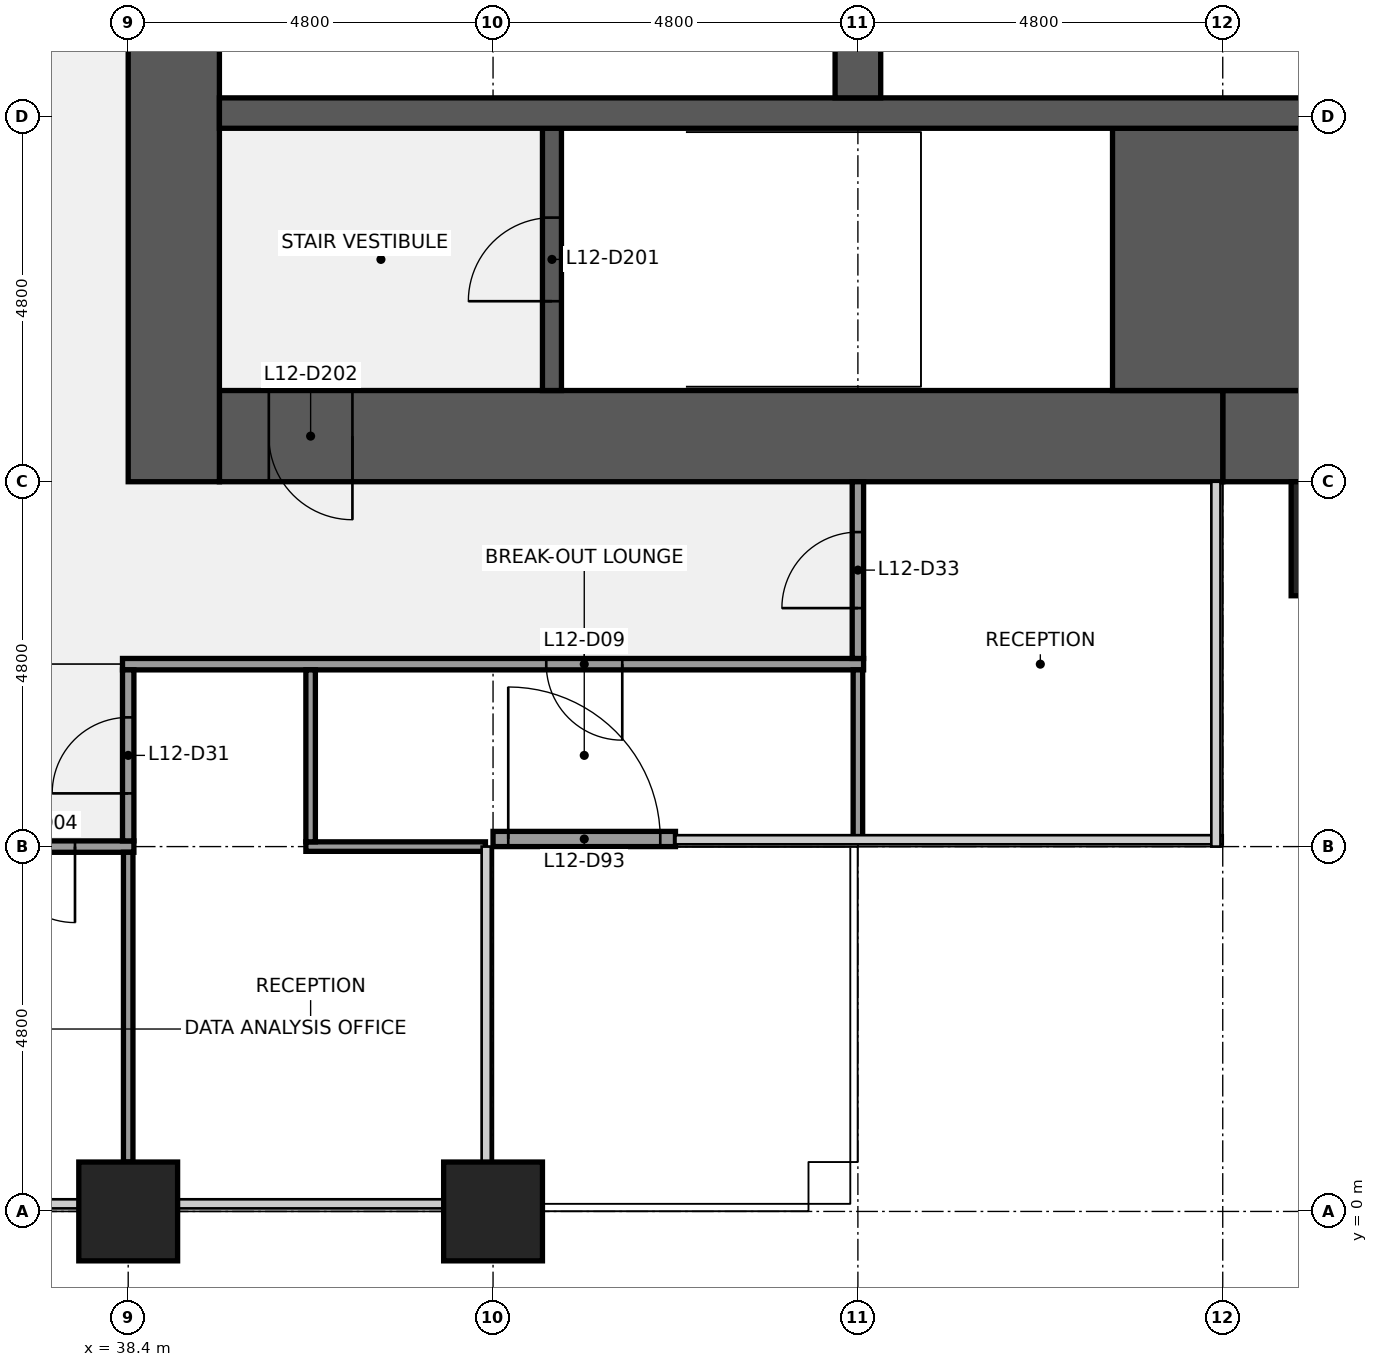
"""IFC4 building model, lengths in metres.
Left out: names, types, materials, properties, quantities, classifications, styles, units other than length and angle.
Written with IfcOpenShell. Run it as: python <this file> out.ifc"""

import sys

from ifc_helpers import new_model, si_unit, direction, frame, frame_2d, origin, origin_2d, place, context, subcontext, project, spatial, rectangle, extrude, element, fill, save


model = new_model("IFC4")
c1 = context("Model", 3, precision=1e-05, world=origin(), true_north=direction((0.0, 1.0)))
c2 = subcontext(c1, "Body", "Model", "MODEL_VIEW")
j1 = project(units=[si_unit("LENGTHUNIT", "METRE"), si_unit("PLANEANGLEUNIT", "RADIAN")], contexts=[c1])
p1 = place(None, origin())
s1 = spatial("IfcSite", under=j1, at=p1, CompositionType="ELEMENT")
p2 = place(p1, origin())
s2 = spatial("IfcBuilding", under=s1, at=p2, CompositionType="ELEMENT")
p3 = place(p2, frame((0.0, 0.0, 59.0)))
s3 = spatial("IfcBuildingStorey", under=s2, at=p3, CompositionType="ELEMENT", Elevation=59.0)
for number, where, z_axis, x_axis in (
    (1, (38.4, 0.0, 0.0), (0.0, 0.0, 1.0), (1.0, 0.0, 0.0)),
    (2, (43.2, 0.0, 0.0), (0.0, 0.0, 1.0), (1.0, 0.0, 0.0)),
):
    element("IfcColumn", number, at=place(p3, frame(where, z_axis=z_axis, x_axis=x_axis)), inside=s3, PredefinedType="COLUMN", context=c2, shape_type="SweptSolid", body=[
        extrude(rectangle(XDim=1.3, YDim=1.3, at=origin_2d()), origin(), (0.0, 0.0, 1.0), 4.0),
    ])
p4 = place(p3, frame((56.4, 10.2, 0.0), z_axis=(0.0, 0.0, 1.0), x_axis=(-1.0, 0.0, 0.0)))
e3 = element("IfcWall", 3, at=p4, inside=s3, PredefinedType="SHEAR", context=c2, shape_type="SweptSolid", body=[
    extrude(rectangle(XDim=3.6, YDim=1.2, at=frame_2d((1.8, 0.0))), origin(), (0.0, 0.0, 1.0), 3.84),
])
p5 = place(p3, frame((52.8, 10.2, 0.0), z_axis=(0.0, 0.0, 1.0), x_axis=(-1.0, 0.0, 0.0)))
e4 = element("IfcWall", 4, at=p5, inside=s3, PredefinedType="SHEAR", context=c2, shape_type="SweptSolid", body=[
    extrude(rectangle(XDim=13.2, YDim=1.2, at=frame_2d((6.6, 0.0))), origin(), (0.0, 0.0, 1.0), 3.84),
])
p6 = place(p5, frame((11.45, 0.0, 0.0)))
e5 = element("IfcOpeningElement", 5, at=p6, cuts=e4, PredefinedType="OPENING", context=c2, shape_type="SweptSolid", body=[
    extrude(rectangle(XDim=1.1, YDim=2.1, at=frame_2d((0.55, 1.05))), frame((0.0, 0.61, 0.0), z_axis=(0.0, -1.0, 0.0), x_axis=(1.0, 0.0, 0.0)), (0.0, 0.0, 1.0), 1.22),
])
p7 = place(p3, frame((39.0, 9.6, 0.0), z_axis=(0.0, 0.0, 1.0), x_axis=(0.0, 1.0, 0.0)))
e6 = element("IfcWall", 6, at=p7, inside=s3, PredefinedType="SHEAR", context=c2, shape_type="SweptSolid", body=[
    extrude(rectangle(XDim=28.8, YDim=1.2, at=frame_2d((14.4, 0.0))), origin(), (0.0, 0.0, 1.0), 3.84),
])
p8 = place(p7, frame((8.7, 0.0, 0.0)))
e7 = element("IfcOpeningElement", 7, at=p8, cuts=e6, PredefinedType="OPENING", context=c2, shape_type="SweptSolid", body=[
    extrude(rectangle(XDim=1.8, YDim=2.1, at=frame_2d((0.9, 1.05))), frame((0.0, 0.61, 0.0), z_axis=(0.0, -1.0, 0.0), x_axis=(1.0, 0.0, 0.0)), (0.0, 0.0, 1.0), 1.22),
])
p9 = place(p7, frame((18.3, 0.0, 0.0)))
e8 = element("IfcOpeningElement", 8, at=p9, cuts=e6, PredefinedType="OPENING", context=c2, shape_type="SweptSolid", body=[
    extrude(rectangle(XDim=1.8, YDim=2.1, at=frame_2d((0.9, 1.05))), frame((0.0, 0.61, 0.0), z_axis=(0.0, -1.0, 0.0), x_axis=(1.0, 0.0, 0.0)), (0.0, 0.0, 1.0), 1.22),
])
p10 = place(p3, frame((51.35, 12.525, 0.0), z_axis=(0.0, 0.0, 1.0), x_axis=(1.0, 0.0, 0.0)))
e9 = element("IfcWall", 9, at=p10, inside=s3, PredefinedType="SHEAR", context=c2, shape_type="SweptSolid", body=[
    extrude(rectangle(XDim=5.05, YDim=3.45, at=frame_2d((2.525, 0.0))), origin(), (0.0, 0.0, 1.0), 3.84),
])
p11 = place(p3, frame((43.975, 10.8, 0.0), z_axis=(0.0, 0.0, 1.0), x_axis=(0.0, 1.0, 0.0)))
e10 = element("IfcWall", 10, at=p11, inside=s3, PredefinedType="SHEAR", context=c2, shape_type="SweptSolid", body=[
    extrude(rectangle(XDim=3.45, YDim=0.25, at=frame_2d((1.725, 0.0))), origin(), (0.0, 0.0, 1.0), 3.84),
])
p12 = place(p11, frame((1.175, 0.0, 0.0)))
e11 = element("IfcOpeningElement", 11, at=p12, cuts=e10, PredefinedType="OPENING", context=c2, shape_type="SweptSolid", body=[
    extrude(rectangle(XDim=1.1, YDim=2.1, at=frame_2d((0.55, 1.05))), frame((0.0, 0.135, 0.0), z_axis=(0.0, -1.0, 0.0), x_axis=(1.0, 0.0, 0.0)), (0.0, 0.0, 1.0), 0.27),
])
p13 = place(p3, frame((39.6, 14.45, 0.0), z_axis=(0.0, 0.0, 1.0), x_axis=(1.0, 0.0, 0.0)))
e12 = element("IfcWall", 12, at=p13, inside=s3, PredefinedType="SHEAR", context=c2, shape_type="SweptSolid", body=[
    extrude(rectangle(XDim=16.8, YDim=0.4, at=frame_2d((8.4, 0.0))), origin(), (0.0, 0.0, 1.0), 3.84),
])
p14 = place(p3, frame((48.0, 14.65, 0.0), z_axis=(0.0, 0.0, 1.0), x_axis=(0.0, 1.0, 0.0)))
e13 = element("IfcWall", 13, at=p14, inside=s3, PredefinedType="SHEAR", context=c2, shape_type="SweptSolid", body=[
    extrude(rectangle(XDim=2.6, YDim=0.6, at=frame_2d((1.3, 0.0))), origin(), (0.0, 0.0, 1.0), 3.84),
])
p15 = place(p3, frame((40.738, 4.8, 0.0), z_axis=(0.0, 0.0, 1.0), x_axis=(1.0, 0.0, 0.0)))
e14 = element("IfcWall", 14, at=p15, inside=s3, PredefinedType="PARTITIONING", context=c2, shape_type="SweptSolid", body=[
    extrude(rectangle(XDim=2.363, YDim=0.125, at=frame_2d((1.181, 0.0))), origin(), (0.0, 0.0, 1.0), 2.87),
])
p16 = place(p3, frame((19.125, 4.8, 0.0), z_axis=(0.0, 0.0, 1.0), x_axis=(1.0, 0.0, 0.0)))
e15 = element("IfcWall", 15, at=p16, inside=s3, PredefinedType="PARTITIONING", context=c2, shape_type="SweptSolid", body=[
    extrude(rectangle(XDim=19.35, YDim=0.15, at=frame_2d((9.675, 0.0))), origin(), (0.0, 0.0, 1.0), 2.87),
])
p17 = place(p16, frame((4.375, 0.0, 0.0)))
e16 = element("IfcOpeningElement", 16, at=p17, cuts=e15, PredefinedType="OPENING", context=c2, shape_type="SweptSolid", body=[
    extrude(rectangle(XDim=1.0, YDim=2.1, at=frame_2d((0.5, 1.05))), frame((0.0, 0.085, 0.0), z_axis=(0.0, -1.0, 0.0), x_axis=(1.0, 0.0, 0.0)), (0.0, 0.0, 1.0), 0.17),
])
p18 = place(p16, frame((10.375, 0.0, 0.0)))
e17 = element("IfcOpeningElement", 17, at=p18, cuts=e15, PredefinedType="OPENING", context=c2, shape_type="SweptSolid", body=[
    extrude(rectangle(XDim=1.0, YDim=2.1, at=frame_2d((0.5, 1.05))), frame((0.0, 0.085, 0.0), z_axis=(0.0, -1.0, 0.0), x_axis=(1.0, 0.0, 0.0)), (0.0, 0.0, 1.0), 0.17),
])
p19 = place(p16, frame((13.975, 0.0, 0.0)))
e18 = element("IfcOpeningElement", 18, at=p19, cuts=e15, PredefinedType="OPENING", context=c2, shape_type="SweptSolid", body=[
    extrude(rectangle(XDim=1.0, YDim=2.1, at=frame_2d((0.5, 1.05))), frame((0.0, 0.085, 0.0), z_axis=(0.0, -1.0, 0.0), x_axis=(1.0, 0.0, 0.0)), (0.0, 0.0, 1.0), 0.17),
])
p20 = place(p16, frame((17.575, 0.0, 0.0)))
e19 = element("IfcOpeningElement", 19, at=p20, cuts=e15, PredefinedType="OPENING", context=c2, shape_type="SweptSolid", body=[
    extrude(rectangle(XDim=1.0, YDim=2.1, at=frame_2d((0.5, 1.05))), frame((0.0, 0.085, 0.0), z_axis=(0.0, -1.0, 0.0), x_axis=(1.0, 0.0, 0.0)), (0.0, 0.0, 1.0), 0.17),
])
p21 = place(p3, frame((38.325, 7.2, 0.0), z_axis=(0.0, 0.0, 1.0), x_axis=(1.0, 0.0, 0.0)))
e20 = element("IfcWall", 20, at=p21, inside=s3, PredefinedType="PARTITIONING", context=c2, shape_type="SweptSolid", body=[
    extrude(rectangle(XDim=9.75, YDim=0.15, at=frame_2d((4.875, 0.0))), origin(), (0.0, 0.0, 1.0), 2.87),
])
p22 = place(p21, frame((5.575, 0.0, 0.0)))
e21 = element("IfcOpeningElement", 21, at=p22, cuts=e20, PredefinedType="OPENING", context=c2, shape_type="SweptSolid", body=[
    extrude(rectangle(XDim=1.0, YDim=2.1, at=frame_2d((0.5, 1.05))), frame((0.0, 0.085, 0.0), z_axis=(0.0, -1.0, 0.0), x_axis=(1.0, 0.0, 0.0)), (0.0, 0.0, 1.0), 0.17),
])
p23 = place(p3, frame((38.4, 0.65, 0.0), z_axis=(0.0, 0.0, 1.0), x_axis=(0.0, 1.0, 0.0)))
e22 = element("IfcWall", 22, at=p23, inside=s3, PredefinedType="PARTITIONING", context=c2, shape_type="SweptSolid", body=[
    extrude(rectangle(XDim=4.075, YDim=0.125, at=frame_2d((2.038, 0.0))), origin(), (0.0, 0.0, 1.0), 2.87),
])
p24 = place(p3, frame((38.4, 4.875, 0.0), z_axis=(0.0, 0.0, 1.0), x_axis=(0.0, 1.0, 0.0)))
e23 = element("IfcWall", 23, at=p24, inside=s3, PredefinedType="PARTITIONING", context=c2, shape_type="SweptSolid", body=[
    extrude(rectangle(XDim=2.25, YDim=0.15, at=frame_2d((1.125, 0.0))), origin(), (0.0, 0.0, 1.0), 2.87),
])
p25 = place(p24, frame((0.625, 0.0, 0.0)))
e24 = element("IfcOpeningElement", 24, at=p25, cuts=e23, PredefinedType="OPENING", context=c2, shape_type="SweptSolid", body=[
    extrude(rectangle(XDim=1.0, YDim=2.1, at=frame_2d((0.5, 1.05))), frame((0.0, 0.085, 0.0), z_axis=(0.0, -1.0, 0.0), x_axis=(1.0, 0.0, 0.0)), (0.0, 0.0, 1.0), 0.17),
])
p26 = place(p3, frame((40.8, 4.863, 0.0), z_axis=(0.0, 0.0, 1.0), x_axis=(0.0, 1.0, 0.0)))
e25 = element("IfcWall", 25, at=p26, inside=s3, PredefinedType="PARTITIONING", context=c2, shape_type="SweptSolid", body=[
    extrude(rectangle(XDim=2.262, YDim=0.125, at=frame_2d((1.131, 0.0))), origin(), (0.0, 0.0, 1.0), 2.87),
])
p27 = place(p3, frame((48.0, 4.9, 0.0), z_axis=(0.0, 0.0, 1.0), x_axis=(0.0, 1.0, 0.0)))
e26 = element("IfcWall", 26, at=p27, inside=s3, PredefinedType="PARTITIONING", context=c2, shape_type="SweptSolid", body=[
    extrude(rectangle(XDim=2.225, YDim=0.125, at=frame_2d((1.113, 0.0))), origin(), (0.0, 0.0, 1.0), 2.87),
])
p28 = place(p3, frame((48.0, 7.275, 0.0), z_axis=(0.0, 0.0, 1.0), x_axis=(0.0, 1.0, 0.0)))
e27 = element("IfcWall", 27, at=p28, inside=s3, PredefinedType="PARTITIONING", context=c2, shape_type="SweptSolid", body=[
    extrude(rectangle(XDim=2.325, YDim=0.15, at=frame_2d((1.163, 0.0))), origin(), (0.0, 0.0, 1.0), 2.87),
])
p29 = place(p28, frame((0.663, 0.0, 0.0)))
e28 = element("IfcOpeningElement", 28, at=p29, cuts=e27, PredefinedType="OPENING", context=c2, shape_type="SweptSolid", body=[
    extrude(rectangle(XDim=1.0, YDim=2.1, at=frame_2d((0.5, 1.05))), frame((0.0, 0.085, 0.0), z_axis=(0.0, -1.0, 0.0), x_axis=(1.0, 0.0, 0.0)), (0.0, 0.0, 1.0), 0.17),
])
p30 = place(p3, frame((55.2, 8.85, 0.0), z_axis=(0.0, 0.0, 1.0), x_axis=(1.0, 0.0, 0.0)))
e29 = element("IfcColumn", 29, at=p30, inside=s3, PredefinedType="PILASTER", context=c2, shape_type="SweptSolid", body=[
    extrude(rectangle(XDim=3.0, YDim=1.5, at=origin_2d()), origin(), (0.0, 0.0, 1.0), 4.0),
])
p31 = place(p3, frame((43.2, 4.9, 0.0), z_axis=(0.0, 0.0, 1.0), x_axis=(1.0, 0.0, 0.0)))
e30 = element("IfcWall", 30, at=p31, inside=s3, PredefinedType="SOLIDWALL", context=c2, shape_type="SweptSolid", body=[
    extrude(rectangle(XDim=2.4, YDim=0.2, at=frame_2d((1.2, 0.0))), origin(), (0.0, 0.0, 1.0), 3.228),
])
p32 = place(p31, frame((0.2, 0.0, 0.0)))
e31 = element("IfcOpeningElement", 31, at=p32, cuts=e30, PredefinedType="OPENING", context=c2, shape_type="SweptSolid", body=[
    extrude(rectangle(XDim=2.0, YDim=2.1, at=frame_2d((1.0, 1.05))), frame((0.0, 0.11, 0.0), z_axis=(0.0, -1.0, 0.0), x_axis=(1.0, 0.0, 0.0)), (0.0, 0.0, 1.0), 0.22),
])
for number, where, z_axis, x_axis in (
    (32, (38.4, -1.075, 0.0), (0.0, 0.0, 1.0), (1.0, 0.0, 0.0)),
    (33, (43.2, -1.075, 0.0), (0.0, 0.0, 1.0), (1.0, 0.0, 0.0)),
):
    element("IfcColumn", number, at=place(p3, frame(where, z_axis=z_axis, x_axis=x_axis)), inside=s3, PredefinedType="PILASTER", context=c2, shape_type="SweptSolid", body=[
        extrude(rectangle(XDim=4.2, YDim=0.85, at=origin_2d()), origin(), (0.0, 0.0, 1.0), 4.0),
    ])
p33 = place(p12, origin())
e34 = element("IfcDoor", 34, at=p33, inside=s3, OperationType="SINGLE_SWING_LEFT", PredefinedType="DOOR", context=c2, shape_type="SweptSolid", body=[
    extrude(rectangle(XDim=1.1, YDim=2.1, at=frame_2d((0.55, 1.05))), frame((0.0, 0.025, 0.0), z_axis=(0.0, -1.0, 0.0), x_axis=(1.0, 0.0, 0.0)), (0.0, 0.0, 1.0), 0.05),
])
fill(e11, e34)
p34 = place(p6, origin())
e35 = element("IfcDoor", 35, at=p34, inside=s3, OperationType="SINGLE_SWING_LEFT", PredefinedType="DOOR", context=c2, shape_type="SweptSolid", body=[
    extrude(rectangle(XDim=1.1, YDim=2.1, at=frame_2d((0.55, 1.05))), frame((0.0, 0.025, 0.0), z_axis=(0.0, -1.0, 0.0), x_axis=(1.0, 0.0, 0.0)), (0.0, 0.0, 1.0), 0.05),
])
fill(e5, e35)
p35 = place(p20, origin())
e36 = element("IfcDoor", 36, at=p35, inside=s3, OperationType="SINGLE_SWING_RIGHT", PredefinedType="DOOR", context=c2, shape_type="SweptSolid", body=[
    extrude(rectangle(XDim=1.0, YDim=2.1, at=frame_2d((0.5, 1.05))), frame((0.0, 0.025, 0.0), z_axis=(0.0, -1.0, 0.0), x_axis=(1.0, 0.0, 0.0)), (0.0, 0.0, 1.0), 0.05),
])
fill(e19, e36)
p36 = place(p22, origin())
e37 = element("IfcDoor", 37, at=p36, inside=s3, OperationType="SINGLE_SWING_RIGHT", PredefinedType="DOOR", context=c2, shape_type="SweptSolid", body=[
    extrude(rectangle(XDim=1.0, YDim=2.1, at=frame_2d((0.5, 1.05))), frame((0.0, 0.025, 0.0), z_axis=(0.0, -1.0, 0.0), x_axis=(1.0, 0.0, 0.0)), (0.0, 0.0, 1.0), 0.05),
])
fill(e21, e37)
p37 = place(p25, origin())
e38 = element("IfcDoor", 38, at=p37, inside=s3, OperationType="SINGLE_SWING_LEFT", PredefinedType="DOOR", context=c2, shape_type="SweptSolid", body=[
    extrude(rectangle(XDim=1.0, YDim=2.1, at=frame_2d((0.5, 1.05))), frame((0.0, 0.025, 0.0), z_axis=(0.0, -1.0, 0.0), x_axis=(1.0, 0.0, 0.0)), (0.0, 0.0, 1.0), 0.05),
])
fill(e24, e38)
p38 = place(p29, origin())
e39 = element("IfcDoor", 39, at=p38, inside=s3, OperationType="SINGLE_SWING_LEFT", PredefinedType="DOOR", context=c2, shape_type="SweptSolid", body=[
    extrude(rectangle(XDim=1.0, YDim=2.1, at=frame_2d((0.5, 1.05))), frame((0.0, 0.025, 0.0), z_axis=(0.0, -1.0, 0.0), x_axis=(1.0, 0.0, 0.0)), (0.0, 0.0, 1.0), 0.05),
])
fill(e28, e39)
p39 = place(p32, origin())
e40 = element("IfcDoor", 40, at=p39, inside=s3, OperationType="SINGLE_SWING_LEFT", PredefinedType="DOOR", context=c2, shape_type="SweptSolid", body=[
    extrude(rectangle(XDim=2.0, YDim=2.1, at=frame_2d((1.0, 1.05))), frame((0.0, 0.025, 0.0), z_axis=(0.0, -1.0, 0.0), x_axis=(1.0, 0.0, 0.0)), (0.0, 0.0, 1.0), 0.05),
])
fill(e31, e40)
save(model, sys.argv[1])
